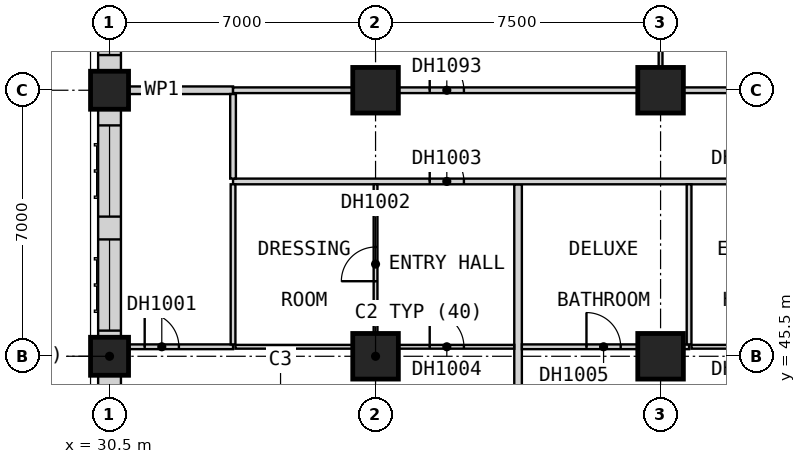
"""IFC4 building model, lengths in metres.
Left out: names, types, materials, properties, quantities, classifications, styles, units other than length and angle.
Written with IfcOpenShell. Run it as: python <this file> out.ifc"""

import sys

from ifc_helpers import new_model, si_unit, direction, frame, frame_2d, origin, origin_2d, place, context, subcontext, project, spatial, rectangle, extrude, element, fill, save


model = new_model("IFC4")
c1 = context("Model", 3, precision=1e-05, world=origin(), true_north=direction((0.0, 1.0)))
c2 = subcontext(c1, "Body", "Model", "MODEL_VIEW")
j1 = project(units=[si_unit("LENGTHUNIT", "METRE"), si_unit("PLANEANGLEUNIT", "RADIAN")], contexts=[c1])
p1 = place(None, origin())
s1 = spatial("IfcSite", under=j1, at=p1, CompositionType="ELEMENT")
p2 = place(p1, origin())
s2 = spatial("IfcBuilding", under=s1, at=p2, CompositionType="ELEMENT")
p3 = place(p2, frame((0.0, 0.0, 34.0)))
s3 = spatial("IfcBuildingStorey", under=s2, at=p3, CompositionType="ELEMENT", Elevation=34.0)
for number, where, z_axis, x_axis in (
    (1, (30.5, 45.5, 0.0), (0.0, 0.0, 1.0), (1.0, 0.0, 0.0)),
    (2, (30.5, 52.5, 0.0), (0.0, 0.0, 1.0), (1.0, 0.0, 0.0)),
):
    element("IfcColumn", number, at=place(p3, frame(where, z_axis=z_axis, x_axis=x_axis)), inside=s3, PredefinedType="COLUMN", context=c2, shape_type="SweptSolid", body=[
        extrude(rectangle(XDim=1.0, YDim=1.0, at=origin_2d()), origin(), (0.0, 0.0, 1.0), 3.6),
    ])
for number, where, z_axis, x_axis in (
    (3, (37.5, 45.5, 0.0), (0.0, 0.0, 1.0), (1.0, 0.0, 0.0)),
    (4, (37.5, 52.5, 0.0), (0.0, 0.0, 1.0), (1.0, 0.0, 0.0)),
    (5, (45.0, 45.5, 0.0), (0.0, 0.0, 1.0), (1.0, 0.0, 0.0)),
    (6, (45.0, 52.5, 0.0), (0.0, 0.0, 1.0), (1.0, 0.0, 0.0)),
):
    element("IfcColumn", number, at=place(p3, frame(where, z_axis=z_axis, x_axis=x_axis)), inside=s3, PredefinedType="COLUMN", context=c2, shape_type="SweptSolid", body=[
        extrude(rectangle(XDim=1.2, YDim=1.2, at=origin_2d()), origin(), (0.0, 0.0, 1.0), 3.6),
    ])
p4 = place(p3, frame((30.5, 60.0, 0.0), z_axis=(0.0, 0.0, 1.0), x_axis=(0.0, -1.0, 0.0)))
e7 = element("IfcWall", 7, at=p4, inside=s3, PredefinedType="SOLIDWALL", context=c2, shape_type="SweptSolid", body=[
    extrude(rectangle(XDim=7.0, YDim=0.6, at=frame_2d((3.5, 0.0))), origin(), (0.0, 0.0, 1.0), 3.35),
])
p5 = place(p4, frame((4.175, 0.0, 0.8)))
e8 = element("IfcOpeningElement", 8, at=p5, cuts=e7, PredefinedType="OPENING", context=c2, shape_type="SweptSolid", body=[
    extrude(rectangle(XDim=2.4, YDim=1.8, at=frame_2d((1.2, 0.9))), frame((0.0, 0.31, 0.0), z_axis=(0.0, -1.0, 0.0), x_axis=(1.0, 0.0, 0.0)), (0.0, 0.0, 1.0), 0.62),
])
p6 = place(p4, frame((0.675, 0.0, 0.8)))
e9 = element("IfcOpeningElement", 9, at=p6, cuts=e7, PredefinedType="OPENING", context=c2, shape_type="SweptSolid", body=[
    extrude(rectangle(XDim=2.4, YDim=1.8, at=frame_2d((1.2, 0.9))), frame((0.0, 0.31, 0.0), z_axis=(0.0, -1.0, 0.0), x_axis=(1.0, 0.0, 0.0)), (0.0, 0.0, 1.0), 0.62),
])
p7 = place(p3, frame((30.5, 52.0, 0.0), z_axis=(0.0, 0.0, 1.0), x_axis=(0.0, -1.0, 0.0)))
e10 = element("IfcWall", 10, at=p7, inside=s3, PredefinedType="SOLIDWALL", context=c2, shape_type="SweptSolid", body=[
    extrude(rectangle(XDim=6.0, YDim=0.6, at=frame_2d((3.0, 0.0))), origin(), (0.0, 0.0, 1.0), 2.85),
])
p8 = place(p7, frame((3.425, 0.0, 0.8)))
e11 = element("IfcOpeningElement", 11, at=p8, cuts=e10, PredefinedType="OPENING", context=c2, shape_type="SweptSolid", body=[
    extrude(rectangle(XDim=2.4, YDim=1.8, at=frame_2d((1.2, 0.9))), frame((0.0, 0.31, 0.0), z_axis=(0.0, -1.0, 0.0), x_axis=(1.0, 0.0, 0.0)), (0.0, 0.0, 1.0), 0.62),
])
p9 = place(p7, frame((0.425, 0.0, 0.8)))
e12 = element("IfcOpeningElement", 12, at=p9, cuts=e10, PredefinedType="OPENING", context=c2, shape_type="SweptSolid", body=[
    extrude(rectangle(XDim=2.4, YDim=1.8, at=frame_2d((1.2, 0.9))), frame((0.0, 0.31, 0.0), z_axis=(0.0, -1.0, 0.0), x_axis=(1.0, 0.0, 0.0)), (0.0, 0.0, 1.0), 0.62),
])
p10 = place(p3, frame((30.5, 45.0, 0.0), z_axis=(0.0, 0.0, 1.0), x_axis=(0.0, -1.0, 0.0)))
e13 = element("IfcWall", 13, at=p10, inside=s3, PredefinedType="SOLIDWALL", context=c2, shape_type="SweptSolid", body=[
    extrude(rectangle(XDim=4.5, YDim=0.6, at=frame_2d((2.25, 0.0))), origin(), (0.0, 0.0, 1.0), 3.35),
])
p11 = place(p10, frame((0.6, 0.0, 0.8)))
e14 = element("IfcOpeningElement", 14, at=p11, cuts=e13, PredefinedType="OPENING", context=c2, shape_type="SweptSolid", body=[
    extrude(rectangle(XDim=2.4, YDim=1.8, at=frame_2d((1.2, 0.9))), frame((0.0, 0.31, 0.0), z_axis=(0.0, -1.0, 0.0), x_axis=(1.0, 0.0, 0.0)), (0.0, 0.0, 1.0), 0.62),
])
p12 = place(p3, frame((30.0, 52.5, 0.0), z_axis=(0.0, 0.0, 1.0), x_axis=(1.0, 0.0, 0.0)))
e15 = element("IfcWall", 15, at=p12, inside=s3, PredefinedType="PARTITIONING", context=c2, shape_type="SweptSolid", body=[
    extrude(rectangle(XDim=3.75, YDim=0.2, at=frame_2d((1.875, 0.0))), origin(), (0.0, 0.0, 1.0), 3.35),
])
p13 = place(p3, frame((41.25, 38.31, 0.0), z_axis=(0.0, 0.0, 1.0), x_axis=(0.0, 1.0, 0.0)))
e16 = element("IfcWall", 16, at=p13, inside=s3, PredefinedType="PARTITIONING", context=c2, shape_type="SweptSolid", body=[
    extrude(rectangle(XDim=11.715, YDim=0.2, at=frame_2d((5.857, 0.0))), origin(), (0.0, 0.0, 1.0), 3.35),
])
p14 = place(p3, frame((33.75, 50.1, 0.0), z_axis=(0.0, 0.0, 1.0), x_axis=(1.0, 0.0, 0.0)))
e17 = element("IfcWall", 17, at=p14, inside=s3, PredefinedType="PARTITIONING", context=c2, shape_type="SweptSolid", body=[
    extrude(rectangle(XDim=43.65, YDim=0.15, at=frame_2d((21.825, 0.0))), origin(), (0.0, 0.0, 1.0), 3.35),
])
p15 = place(p14, frame((5.175, 0.0, 0.0)))
e18 = element("IfcOpeningElement", 18, at=p15, cuts=e17, PredefinedType="OPENING", context=c2, shape_type="SweptSolid", body=[
    extrude(rectangle(XDim=0.9, YDim=2.1, at=frame_2d((0.45, 1.05))), frame((0.0, 0.085, 0.0), z_axis=(0.0, -1.0, 0.0), x_axis=(1.0, 0.0, 0.0)), (0.0, 0.0, 1.0), 0.17),
])
p16 = place(p14, frame((13.05, 0.0, 0.0)))
e19 = element("IfcOpeningElement", 19, at=p16, cuts=e17, PredefinedType="OPENING", context=c2, shape_type="SweptSolid", body=[
    extrude(rectangle(XDim=0.9, YDim=2.1, at=frame_2d((0.45, 1.05))), frame((0.0, 0.085, 0.0), z_axis=(0.0, -1.0, 0.0), x_axis=(1.0, 0.0, 0.0)), (0.0, 0.0, 1.0), 0.17),
])
p17 = place(p14, frame((17.363, 0.0, 0.0)))
e20 = element("IfcOpeningElement", 20, at=p17, cuts=e17, PredefinedType="OPENING", context=c2, shape_type="SweptSolid", body=[
    extrude(rectangle(XDim=0.9, YDim=2.1, at=frame_2d((0.45, 1.05))), frame((0.0, 0.085, 0.0), z_axis=(0.0, -1.0, 0.0), x_axis=(1.0, 0.0, 0.0)), (0.0, 0.0, 1.0), 0.17),
])
p18 = place(p14, frame((21.113, 0.0, 0.0)))
e21 = element("IfcOpeningElement", 21, at=p18, cuts=e17, PredefinedType="OPENING", context=c2, shape_type="SweptSolid", body=[
    extrude(rectangle(XDim=0.9, YDim=2.1, at=frame_2d((0.45, 1.05))), frame((0.0, 0.085, 0.0), z_axis=(0.0, -1.0, 0.0), x_axis=(1.0, 0.0, 0.0)), (0.0, 0.0, 1.0), 0.17),
])
p19 = place(p14, frame((24.863, 0.0, 0.0)))
e22 = element("IfcOpeningElement", 22, at=p19, cuts=e17, PredefinedType="OPENING", context=c2, shape_type="SweptSolid", body=[
    extrude(rectangle(XDim=0.9, YDim=2.1, at=frame_2d((0.45, 1.05))), frame((0.0, 0.085, 0.0), z_axis=(0.0, -1.0, 0.0), x_axis=(1.0, 0.0, 0.0)), (0.0, 0.0, 1.0), 0.17),
])
p20 = place(p14, frame((28.613, 0.0, 0.0)))
e23 = element("IfcOpeningElement", 23, at=p20, cuts=e17, PredefinedType="OPENING", context=c2, shape_type="SweptSolid", body=[
    extrude(rectangle(XDim=0.9, YDim=2.1, at=frame_2d((0.45, 1.05))), frame((0.0, 0.085, 0.0), z_axis=(0.0, -1.0, 0.0), x_axis=(1.0, 0.0, 0.0)), (0.0, 0.0, 1.0), 0.17),
])
p21 = place(p14, frame((32.363, 0.0, 0.0)))
e24 = element("IfcOpeningElement", 24, at=p21, cuts=e17, PredefinedType="OPENING", context=c2, shape_type="SweptSolid", body=[
    extrude(rectangle(XDim=0.9, YDim=2.1, at=frame_2d((0.45, 1.05))), frame((0.0, 0.085, 0.0), z_axis=(0.0, -1.0, 0.0), x_axis=(1.0, 0.0, 0.0)), (0.0, 0.0, 1.0), 0.17),
])
p22 = place(p14, frame((39.3, 0.0, 0.0)))
e25 = element("IfcOpeningElement", 25, at=p22, cuts=e17, PredefinedType="OPENING", context=c2, shape_type="SweptSolid", body=[
    extrude(rectangle(XDim=0.9, YDim=2.1, at=frame_2d((0.45, 1.05))), frame((0.0, 0.085, 0.0), z_axis=(0.0, -1.0, 0.0), x_axis=(1.0, 0.0, 0.0)), (0.0, 0.0, 1.0), 0.17),
])
p23 = place(p14, frame((42.0, 0.0, 0.0)))
e26 = element("IfcOpeningElement", 26, at=p23, cuts=e17, PredefinedType="OPENING", context=c2, shape_type="SweptSolid", body=[
    extrude(rectangle(XDim=0.9, YDim=2.1, at=frame_2d((0.45, 1.05))), frame((0.0, 0.085, 0.0), z_axis=(0.0, -1.0, 0.0), x_axis=(1.0, 0.0, 0.0)), (0.0, 0.0, 1.0), 0.17),
])
p24 = place(p3, frame((33.75, 52.5, 0.0), z_axis=(0.0, 0.0, 1.0), x_axis=(1.0, 0.0, 0.0)))
e27 = element("IfcWall", 27, at=p24, inside=s3, PredefinedType="PARTITIONING", context=c2, shape_type="SweptSolid", body=[
    extrude(rectangle(XDim=17.15, YDim=0.15, at=frame_2d((8.575, 0.0))), origin(), (0.0, 0.0, 1.0), 3.35),
])
p25 = place(p24, frame((5.175, 0.0, 0.0)))
e28 = element("IfcOpeningElement", 28, at=p25, cuts=e27, PredefinedType="OPENING", context=c2, shape_type="SweptSolid", body=[
    extrude(rectangle(XDim=0.9, YDim=2.1, at=frame_2d((0.45, 1.05))), frame((0.0, 0.085, 0.0), z_axis=(0.0, -1.0, 0.0), x_axis=(1.0, 0.0, 0.0)), (0.0, 0.0, 1.0), 0.17),
])
p26 = place(p24, frame((13.75, 0.0, 0.0)))
e29 = element("IfcOpeningElement", 29, at=p26, cuts=e27, PredefinedType="OPENING", context=c2, shape_type="SweptSolid", body=[
    extrude(rectangle(XDim=0.9, YDim=2.1, at=frame_2d((0.45, 1.05))), frame((0.0, 0.085, 0.0), z_axis=(0.0, -1.0, 0.0), x_axis=(1.0, 0.0, 0.0)), (0.0, 0.0, 1.0), 0.17),
])
p27 = place(p3, frame((33.75, 50.175, 0.0), z_axis=(0.0, 0.0, 1.0), x_axis=(0.0, 1.0, 0.0)))
e30 = element("IfcWall", 30, at=p27, inside=s3, PredefinedType="PARTITIONING", context=c2, shape_type="SweptSolid", body=[
    extrude(rectangle(XDim=2.225, YDim=0.15, at=frame_2d((1.112, 0.0))), origin(), (0.0, 0.0, 1.0), 3.35),
])
p28 = place(p3, frame((33.812, 45.75, 0.0), z_axis=(0.0, 0.0, 1.0), x_axis=(1.0, 0.0, 0.0)))
e31 = element("IfcWall", 31, at=p28, inside=s3, PredefinedType="PARTITIONING", context=c2, shape_type="SweptSolid", body=[
    extrude(rectangle(XDim=7.337, YDim=0.1, at=frame_2d((3.669, 0.0))), origin(), (0.0, 0.0, 1.0), 3.35),
])
p29 = place(p28, frame((5.113, 0.0, 0.0)))
e32 = element("IfcOpeningElement", 32, at=p29, cuts=e31, PredefinedType="OPENING", context=c2, shape_type="SweptSolid", body=[
    extrude(rectangle(XDim=0.9, YDim=2.1, at=frame_2d((0.45, 1.05))), frame((0.0, 0.06, 0.0), z_axis=(0.0, -1.0, 0.0), x_axis=(1.0, 0.0, 0.0)), (0.0, 0.0, 1.0), 0.12),
])
p30 = place(p3, frame((45.812, 45.75, 0.0), z_axis=(0.0, 0.0, 1.0), x_axis=(1.0, 0.0, 0.0)))
e33 = element("IfcWall", 33, at=p30, inside=s3, PredefinedType="PARTITIONING", context=c2, shape_type="SweptSolid", body=[
    extrude(rectangle(XDim=2.837, YDim=0.1, at=frame_2d((1.419, 0.0))), origin(), (0.0, 0.0, 1.0), 3.35),
])
p31 = place(p30, frame((0.988, 0.0, 0.0)))
e34 = element("IfcOpeningElement", 34, at=p31, cuts=e33, PredefinedType="OPENING", context=c2, shape_type="SweptSolid", body=[
    extrude(rectangle(XDim=0.9, YDim=2.1, at=frame_2d((0.45, 1.05))), frame((0.0, 0.06, 0.0), z_axis=(0.0, -1.0, 0.0), x_axis=(1.0, 0.0, 0.0)), (0.0, 0.0, 1.0), 0.12),
])
p32 = place(p3, frame((37.5, 45.8, 0.0), z_axis=(0.0, 0.0, 1.0), x_axis=(0.0, 1.0, 0.0)))
e35 = element("IfcWall", 35, at=p32, inside=s3, PredefinedType="PARTITIONING", context=c2, shape_type="SweptSolid", body=[
    extrude(rectangle(XDim=4.225, YDim=0.1, at=frame_2d((2.112, 0.0))), origin(), (0.0, 0.0, 1.0), 3.35),
])
p33 = place(p32, frame((1.675, 0.0, 0.0)))
e36 = element("IfcOpeningElement", 36, at=p33, cuts=e35, PredefinedType="OPENING", context=c2, shape_type="SweptSolid", body=[
    extrude(rectangle(XDim=0.9, YDim=2.1, at=frame_2d((0.45, 1.05))), frame((0.0, 0.06, 0.0), z_axis=(0.0, -1.0, 0.0), x_axis=(1.0, 0.0, 0.0)), (0.0, 0.0, 1.0), 0.12),
])
p34 = place(p3, frame((45.0, 52.575, 0.0), z_axis=(0.0, 0.0, 1.0), x_axis=(0.0, 1.0, 0.0)))
e37 = element("IfcWall", 37, at=p34, inside=s3, PredefinedType="PARTITIONING", context=c2, shape_type="SweptSolid", body=[
    extrude(rectangle(XDim=7.425, YDim=0.1, at=frame_2d((3.712, 0.0))), origin(), (0.0, 0.0, 1.0), 3.35),
])
p35 = place(p3, frame((30.0, 45.75, 0.0), z_axis=(0.0, 0.0, 1.0), x_axis=(1.0, 0.0, 0.0)))
e38 = element("IfcWall", 38, at=p35, inside=s3, PredefinedType="PARTITIONING", context=c2, shape_type="SweptSolid", body=[
    extrude(rectangle(XDim=3.75, YDim=0.125, at=frame_2d((1.875, 0.0))), origin(), (0.0, 0.0, 1.0), 3.35),
])
p36 = place(p35, frame((1.425, 0.0, 0.0)))
e39 = element("IfcOpeningElement", 39, at=p36, cuts=e38, PredefinedType="OPENING", context=c2, shape_type="SweptSolid", body=[
    extrude(rectangle(XDim=0.9, YDim=2.1, at=frame_2d((0.45, 1.05))), frame((0.0, 0.073, 0.0), z_axis=(0.0, -1.0, 0.0), x_axis=(1.0, 0.0, 0.0)), (0.0, 0.0, 1.0), 0.145),
])
p37 = place(p3, frame((41.35, 45.75, 0.0), z_axis=(0.0, 0.0, 1.0), x_axis=(1.0, 0.0, 0.0)))
e40 = element("IfcWall", 40, at=p37, inside=s3, PredefinedType="PARTITIONING", context=c2, shape_type="SweptSolid", body=[
    extrude(rectangle(XDim=4.4, YDim=0.125, at=frame_2d((2.2, 0.0))), origin(), (0.0, 0.0, 1.0), 3.35),
])
p38 = place(p37, frame((1.7, 0.0, 0.0)))
e41 = element("IfcOpeningElement", 41, at=p38, cuts=e40, PredefinedType="OPENING", context=c2, shape_type="SweptSolid", body=[
    extrude(rectangle(XDim=0.9, YDim=2.1, at=frame_2d((0.45, 1.05))), frame((0.0, 0.073, 0.0), z_axis=(0.0, -1.0, 0.0), x_axis=(1.0, 0.0, 0.0)), (0.0, 0.0, 1.0), 0.145),
])
for number, where, z_axis, x_axis in (
    (42, (33.75, 45.812, 0.0), (0.0, 0.0, 1.0), (0.0, 1.0, 0.0)),
    (43, (45.75, 45.812, 0.0), (0.0, 0.0, 1.0), (0.0, 1.0, 0.0)),
):
    element("IfcWall", number, at=place(p3, frame(where, z_axis=z_axis, x_axis=x_axis)), inside=s3, PredefinedType="PARTITIONING", context=c2, shape_type="SweptSolid", body=[
        extrude(rectangle(XDim=4.212, YDim=0.125, at=frame_2d((2.106, 0.0))), origin(), (0.0, 0.0, 1.0), 3.35),
    ])
p39 = place(p5, origin())
e44 = element("IfcWindow", 44, at=p39, inside=s3, PartitioningType="SINGLE_PANEL", PredefinedType="WINDOW", context=c2, shape_type="SweptSolid", body=[
    extrude(rectangle(XDim=2.4, YDim=1.8, at=frame_2d((1.2, 0.9))), frame((0.0, -0.07, 0.0), z_axis=(0.0, -1.0, 0.0), x_axis=(1.0, 0.0, 0.0)), (0.0, 0.0, 1.0), 0.06),
])
fill(e8, e44)
p40 = place(p8, origin())
e45 = element("IfcWindow", 45, at=p40, inside=s3, PartitioningType="SINGLE_PANEL", PredefinedType="WINDOW", context=c2, shape_type="SweptSolid", body=[
    extrude(rectangle(XDim=2.4, YDim=1.8, at=frame_2d((1.2, 0.9))), frame((0.0, -0.07, 0.0), z_axis=(0.0, -1.0, 0.0), x_axis=(1.0, 0.0, 0.0)), (0.0, 0.0, 1.0), 0.06),
])
fill(e11, e45)
p41 = place(p9, origin())
e46 = element("IfcWindow", 46, at=p41, inside=s3, PartitioningType="SINGLE_PANEL", PredefinedType="WINDOW", context=c2, shape_type="SweptSolid", body=[
    extrude(rectangle(XDim=2.4, YDim=1.8, at=frame_2d((1.2, 0.9))), frame((0.0, -0.07, 0.0), z_axis=(0.0, -1.0, 0.0), x_axis=(1.0, 0.0, 0.0)), (0.0, 0.0, 1.0), 0.06),
])
fill(e12, e46)
p42 = place(p36, origin())
e47 = element("IfcDoor", 47, at=p42, inside=s3, OperationType="SINGLE_SWING_LEFT", PredefinedType="DOOR", context=c2, shape_type="SweptSolid", body=[
    extrude(rectangle(XDim=0.9, YDim=2.1, at=frame_2d((0.45, 1.05))), frame((0.0, 0.025, 0.0), z_axis=(0.0, -1.0, 0.0), x_axis=(1.0, 0.0, 0.0)), (0.0, 0.0, 1.0), 0.05),
])
fill(e39, e47)
p43 = place(p33, origin())
e48 = element("IfcDoor", 48, at=p43, inside=s3, OperationType="SINGLE_SWING_RIGHT", PredefinedType="DOOR", context=c2, shape_type="SweptSolid", body=[
    extrude(rectangle(XDim=0.9, YDim=2.1, at=frame_2d((0.45, 1.05))), frame((0.0, 0.025, 0.0), z_axis=(0.0, -1.0, 0.0), x_axis=(1.0, 0.0, 0.0)), (0.0, 0.0, 1.0), 0.05),
])
fill(e36, e48)
p44 = place(p15, origin())
e49 = element("IfcDoor", 49, at=p44, inside=s3, OperationType="SINGLE_SWING_RIGHT", PredefinedType="DOOR", context=c2, shape_type="SweptSolid", body=[
    extrude(rectangle(XDim=0.9, YDim=2.1, at=frame_2d((0.45, 1.05))), frame((0.0, 0.025, 0.0), z_axis=(0.0, -1.0, 0.0), x_axis=(1.0, 0.0, 0.0)), (0.0, 0.0, 1.0), 0.05),
])
fill(e18, e49)
p45 = place(p29, origin())
e50 = element("IfcDoor", 50, at=p45, inside=s3, OperationType="SINGLE_SWING_LEFT", PredefinedType="DOOR", context=c2, shape_type="SweptSolid", body=[
    extrude(rectangle(XDim=0.9, YDim=2.1, at=frame_2d((0.45, 1.05))), frame((0.0, 0.025, 0.0), z_axis=(0.0, -1.0, 0.0), x_axis=(1.0, 0.0, 0.0)), (0.0, 0.0, 1.0), 0.05),
])
fill(e32, e50)
p46 = place(p38, origin())
e51 = element("IfcDoor", 51, at=p46, inside=s3, OperationType="SINGLE_SWING_LEFT", PredefinedType="DOOR", context=c2, shape_type="SweptSolid", body=[
    extrude(rectangle(XDim=0.9, YDim=2.1, at=frame_2d((0.45, 1.05))), frame((0.0, 0.025, 0.0), z_axis=(0.0, -1.0, 0.0), x_axis=(1.0, 0.0, 0.0)), (0.0, 0.0, 1.0), 0.05),
])
fill(e41, e51)
p47 = place(p25, origin())
e52 = element("IfcDoor", 52, at=p47, inside=s3, OperationType="SINGLE_SWING_LEFT", PredefinedType="DOOR", context=c2, shape_type="SweptSolid", body=[
    extrude(rectangle(XDim=0.9, YDim=2.1, at=frame_2d((0.45, 1.05))), frame((0.0, 0.025, 0.0), z_axis=(0.0, -1.0, 0.0), x_axis=(1.0, 0.0, 0.0)), (0.0, 0.0, 1.0), 0.05),
])
fill(e28, e52)
save(model, sys.argv[1])
